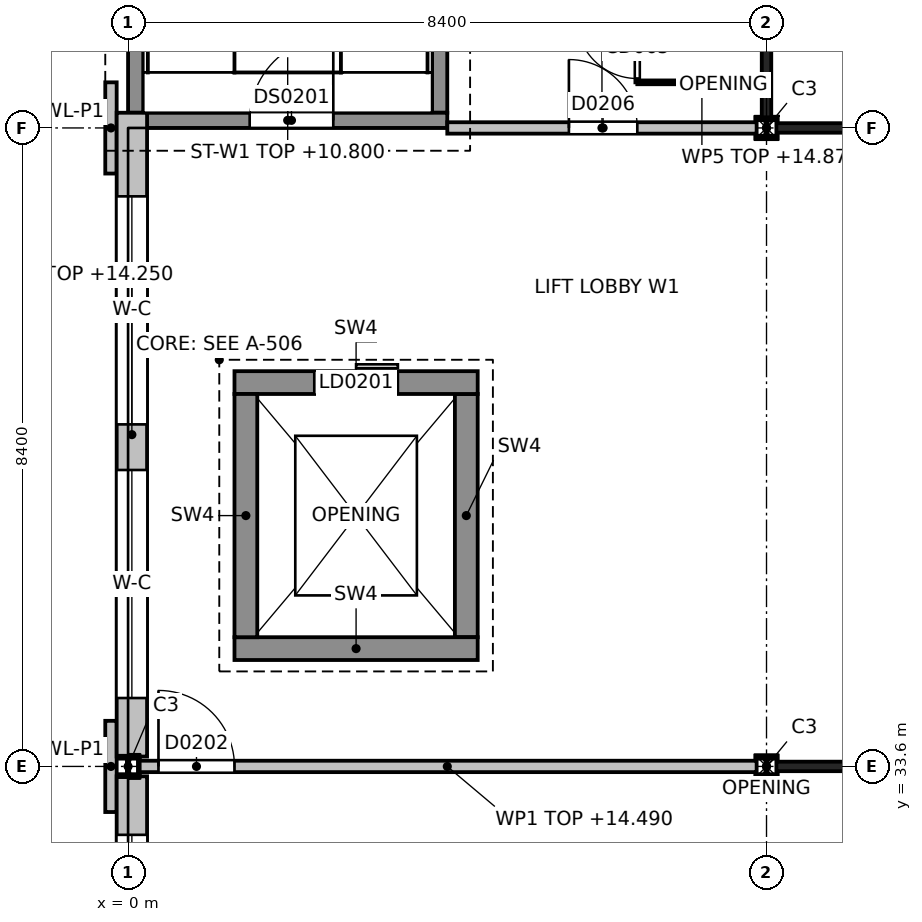
"""IFC4 building model, lengths in metres.
Left out: names, types, materials, properties, quantities, classifications, styles, units other than length and angle.
Written with IfcOpenShell. Run it as: python <this file> out.ifc"""

import sys

from ifc_helpers import new_model, si_unit, direction, frame, frame_2d, origin, origin_2d, place, context, subcontext, project, spatial, rectangle, i_section, extrude, element, fill, save


model = new_model("IFC4")
c1 = context("Model", 3, precision=1e-05, world=origin(), true_north=direction((0.0, 1.0)))
c2 = subcontext(c1, "Body", "Model", "MODEL_VIEW")
j1 = project(units=[si_unit("LENGTHUNIT", "METRE"), si_unit("PLANEANGLEUNIT", "RADIAN")], contexts=[c1])
p1 = place(None, origin())
s1 = spatial("IfcSite", under=j1, at=p1, CompositionType="ELEMENT")
p2 = place(p1, origin())
s2 = spatial("IfcBuilding", under=s1, at=p2, CompositionType="ELEMENT")
p3 = place(p2, frame((0.0, 0.0, 10.8)))
s3 = spatial("IfcBuildingStorey", under=s2, at=p3, CompositionType="ELEMENT", Elevation=10.8)
for number, where, z_axis, x_axis in (
    (1, (0.0, 33.6, 0.0), (0.0, 0.0, 1.0), (1.0, 0.0, 0.0)),
    (2, (8.4, 33.6, 0.0), (0.0, 0.0, 1.0), (1.0, 0.0, 0.0)),
    (3, (8.4, 42.0, 0.0), (0.0, 0.0, 1.0), (1.0, 0.0, 0.0)),
):
    element("IfcColumn", number, at=place(p3, frame(where, z_axis=z_axis, x_axis=x_axis)), inside=s3, PredefinedType="COLUMN", context=c2, shape_type="SweptSolid", body=[
        extrude(i_section(OverallWidth=0.26, OverallDepth=0.26, WebThickness=0.01, FlangeThickness=0.018, at=origin_2d()), origin(), (0.0, 0.0, 1.0), 4.2),
    ])
p4 = place(p3, frame((0.0, 42.1, 0.0), z_axis=(0.0, 0.0, 1.0), x_axis=(1.0, 0.0, 0.0)))
e4 = element("IfcWall", 4, at=p4, inside=s3, PredefinedType="SHEAR", context=c2, shape_type="SweptSolid", body=[
    extrude(rectangle(XDim=4.2, YDim=0.2, at=frame_2d((2.1, 0.0))), origin(), (0.0, 0.0, 1.0), 4.2),
])
p5 = place(p4, frame((1.6, 0.0, 0.0)))
e5 = element("IfcOpeningElement", 5, at=p5, cuts=e4, PredefinedType="OPENING", context=c2, shape_type="SweptSolid", body=[
    extrude(rectangle(XDim=1.1, YDim=2.1, at=frame_2d((0.55, 1.05))), frame((0.0, 0.1, 0.0), z_axis=(0.0, -1.0, 0.0), x_axis=(1.0, 0.0, 0.0)), (0.0, 0.0, 1.0), 0.2),
])
for number, where, z_axis, x_axis in (
    (6, (0.1, 42.2, 0.0), (0.0, 0.0, 1.0), (0.0, 1.0, 0.0)),
    (7, (4.1, 42.2, 0.0), (0.0, 0.0, 1.0), (0.0, 1.0, 0.0)),
):
    element("IfcWall", number, at=place(p3, frame(where, z_axis=z_axis, x_axis=x_axis)), inside=s3, PredefinedType="SHEAR", context=c2, shape_type="SweptSolid", body=[
        extrude(rectangle(XDim=8.0, YDim=0.2, at=frame_2d((4.0, 0.0))), origin(), (0.0, 0.0, 1.0), 4.2),
    ])
p6 = place(p3, frame((1.4, 35.15, 0.0), z_axis=(0.0, 0.0, 1.0), x_axis=(1.0, 0.0, 0.0)))
e8 = element("IfcWall", 8, at=p6, inside=s3, PredefinedType="SHEAR", context=c2, shape_type="SweptSolid", body=[
    extrude(rectangle(XDim=3.2, YDim=0.3, at=frame_2d((1.6, 0.0))), origin(), (0.0, 0.0, 1.0), 4.2),
])
p7 = place(p3, frame((1.4, 38.65, 0.0), z_axis=(0.0, 0.0, 1.0), x_axis=(1.0, 0.0, 0.0)))
e9 = element("IfcWall", 9, at=p7, inside=s3, PredefinedType="SHEAR", context=c2, shape_type="SweptSolid", body=[
    extrude(rectangle(XDim=3.2, YDim=0.3, at=frame_2d((1.6, 0.0))), origin(), (0.0, 0.0, 1.0), 4.2),
])
p8 = place(p7, frame((1.05, 0.0, 0.0)))
e10 = element("IfcOpeningElement", 10, at=p8, cuts=e9, PredefinedType="OPENING", context=c2, shape_type="SweptSolid", body=[
    extrude(rectangle(XDim=1.1, YDim=2.1, at=frame_2d((0.55, 1.05))), frame((0.0, 0.15, 0.0), z_axis=(0.0, -1.0, 0.0), x_axis=(1.0, 0.0, 0.0)), (0.0, 0.0, 1.0), 0.3),
])
for number, where, z_axis, x_axis in (
    (11, (1.55, 35.3, 0.0), (0.0, 0.0, 1.0), (0.0, 1.0, 0.0)),
    (12, (4.45, 35.3, 0.0), (0.0, 0.0, 1.0), (0.0, 1.0, 0.0)),
):
    element("IfcWall", number, at=place(p3, frame(where, z_axis=z_axis, x_axis=x_axis)), inside=s3, PredefinedType="SHEAR", context=c2, shape_type="SweptSolid", body=[
        extrude(rectangle(XDim=3.2, YDim=0.3, at=frame_2d((1.6, 0.0))), origin(), (0.0, 0.0, 1.0), 4.2),
    ])
p9 = place(p3, frame((0.05, 25.33, 0.0), z_axis=(0.0, 0.0, 1.0), x_axis=(0.0, 1.0, 0.0)))
e13 = element("IfcWall", 13, at=p9, inside=s3, PredefinedType="SOLIDWALL", context=c2, shape_type="SweptSolid", body=[
    extrude(rectangle(XDim=8.14, YDim=0.4, at=frame_2d((4.07, 0.0))), origin(), (0.0, 0.0, 1.0), 3.45),
])
p10 = place(p9, frame((0.77, 0.0, 0.9)))
e14 = element("IfcOpeningElement", 14, at=p10, cuts=e13, PredefinedType="OPENING", context=c2, shape_type="SweptSolid", body=[
    extrude(rectangle(XDim=3.0, YDim=2.4, at=frame_2d((1.5, 1.2))), frame((0.0, 0.2, 0.0), z_axis=(0.0, -1.0, 0.0), x_axis=(1.0, 0.0, 0.0)), (0.0, 0.0, 1.0), 0.4),
])
p11 = place(p9, frame((4.37, 0.0, 0.9)))
e15 = element("IfcOpeningElement", 15, at=p11, cuts=e13, PredefinedType="OPENING", context=c2, shape_type="SweptSolid", body=[
    extrude(rectangle(XDim=3.0, YDim=2.4, at=frame_2d((1.5, 1.2))), frame((0.0, 0.2, 0.0), z_axis=(0.0, -1.0, 0.0), x_axis=(1.0, 0.0, 0.0)), (0.0, 0.0, 1.0), 0.4),
])
p12 = place(p3, frame((0.05, 33.73, 0.0), z_axis=(0.0, 0.0, 1.0), x_axis=(0.0, 1.0, 0.0)))
e16 = element("IfcWall", 16, at=p12, inside=s3, PredefinedType="SOLIDWALL", context=c2, shape_type="SweptSolid", body=[
    extrude(rectangle(XDim=8.47, YDim=0.4, at=frame_2d((4.235, 0.0))), origin(), (0.0, 0.0, 1.0), 3.45),
])
p13 = place(p12, frame((0.77, 0.0, 0.9)))
e17 = element("IfcOpeningElement", 17, at=p13, cuts=e16, PredefinedType="OPENING", context=c2, shape_type="SweptSolid", body=[
    extrude(rectangle(XDim=3.0, YDim=2.4, at=frame_2d((1.5, 1.2))), frame((0.0, 0.2, 0.0), z_axis=(0.0, -1.0, 0.0), x_axis=(1.0, 0.0, 0.0)), (0.0, 0.0, 1.0), 0.4),
])
p14 = place(p12, frame((4.37, 0.0, 0.9)))
e18 = element("IfcOpeningElement", 18, at=p14, cuts=e16, PredefinedType="OPENING", context=c2, shape_type="SweptSolid", body=[
    extrude(rectangle(XDim=3.0, YDim=2.4, at=frame_2d((1.5, 1.2))), frame((0.0, 0.2, 0.0), z_axis=(0.0, -1.0, 0.0), x_axis=(1.0, 0.0, 0.0)), (0.0, 0.0, 1.0), 0.4),
])
p15 = place(p3, frame((-0.225, 33.0, 0.0), z_axis=(0.0, 0.0, 1.0), x_axis=(0.0, 1.0, 0.0)))
e19 = element("IfcWall", 19, at=p15, inside=s3, PredefinedType="SOLIDWALL", context=c2, shape_type="SweptSolid", body=[
    extrude(rectangle(XDim=1.2, YDim=0.15, at=frame_2d((0.6, 0.0))), origin(), (0.0, 0.0, 1.0), 4.2),
])
p16 = place(p3, frame((-0.225, 41.4, 0.0), z_axis=(0.0, 0.0, 1.0), x_axis=(0.0, 1.0, 0.0)))
e20 = element("IfcWall", 20, at=p16, inside=s3, PredefinedType="SOLIDWALL", context=c2, shape_type="SweptSolid", body=[
    extrude(rectangle(XDim=1.2, YDim=0.15, at=frame_2d((0.6, 0.0))), origin(), (0.0, 0.0, 1.0), 4.2),
])
p17 = place(p3, frame((0.13, 33.6, 0.0), z_axis=(0.0, 0.0, 1.0), x_axis=(1.0, 0.0, 0.0)))
e21 = element("IfcWall", 21, at=p17, inside=s3, PredefinedType="PARTITIONING", context=c2, shape_type="SweptSolid", body=[
    extrude(rectangle(XDim=8.14, YDim=0.15, at=frame_2d((4.07, 0.0))), origin(), (0.0, 0.0, 1.0), 3.69),
])
p18 = place(p17, frame((0.27, 0.0, 0.0)))
e22 = element("IfcOpeningElement", 22, at=p18, cuts=e21, PredefinedType="OPENING", context=c2, shape_type="SweptSolid", body=[
    extrude(rectangle(XDim=1.0, YDim=2.2, at=frame_2d((0.5, 1.1))), frame((0.0, 0.075, 0.0), z_axis=(0.0, -1.0, 0.0), x_axis=(1.0, 0.0, 0.0)), (0.0, 0.0, 1.0), 0.15),
])
p19 = place(p3, frame((8.53, 33.6, 0.0), z_axis=(0.0, 0.0, 1.0), x_axis=(1.0, 0.0, 0.0)))
e23 = element("IfcWall", 23, at=p19, inside=s3, PredefinedType="PARTITIONING", context=c2, shape_type="SweptSolid", body=[
    extrude(rectangle(XDim=8.14, YDim=0.125, at=frame_2d((4.07, 0.0))), origin(), (0.0, 0.0, 1.0), 3.69),
])
p20 = place(p19, frame((3.57, 0.0, 0.0)))
e24 = element("IfcOpeningElement", 24, at=p20, cuts=e23, PredefinedType="OPENING", context=c2, shape_type="SweptSolid", body=[
    extrude(rectangle(XDim=1.0, YDim=2.2, at=frame_2d((0.5, 1.1))), frame((0.0, 0.062, 0.0), z_axis=(0.0, -1.0, 0.0), x_axis=(1.0, 0.0, 0.0)), (0.0, 0.0, 1.0), 0.125),
])
p21 = place(p3, frame((4.2, 42.0, 0.0), z_axis=(0.0, 0.0, 1.0), x_axis=(1.0, 0.0, 0.0)))
e25 = element("IfcWall", 25, at=p21, inside=s3, PredefinedType="PARTITIONING", context=c2, shape_type="SweptSolid", body=[
    extrude(rectangle(XDim=4.07, YDim=0.15, at=frame_2d((2.035, 0.0))), origin(), (0.0, 0.0, 1.0), 4.07),
])
p22 = place(p21, frame((1.6, 0.0, 0.0)))
e26 = element("IfcOpeningElement", 26, at=p22, cuts=e25, PredefinedType="OPENING", context=c2, shape_type="SweptSolid", body=[
    extrude(rectangle(XDim=0.9, YDim=2.1, at=frame_2d((0.45, 1.05))), frame((0.0, 0.075, 0.0), z_axis=(0.0, -1.0, 0.0), x_axis=(1.0, 0.0, 0.0)), (0.0, 0.0, 1.0), 0.15),
])
p23 = place(p3, frame((8.53, 42.0, 0.0), z_axis=(0.0, 0.0, 1.0), x_axis=(1.0, 0.0, 0.0)))
e27 = element("IfcWall", 27, at=p23, inside=s3, PredefinedType="PARTITIONING", context=c2, shape_type="SweptSolid", body=[
    extrude(rectangle(XDim=4.07, YDim=0.125, at=frame_2d((2.035, 0.0))), origin(), (0.0, 0.0, 1.0), 3.71),
])
p24 = place(p23, frame((1.47, 0.0, 0.0)))
e28 = element("IfcOpeningElement", 28, at=p24, cuts=e27, PredefinedType="OPENING", context=c2, shape_type="SweptSolid", body=[
    extrude(rectangle(XDim=1.0, YDim=2.1, at=frame_2d((0.5, 1.05))), frame((0.0, 0.062, 0.0), z_axis=(0.0, -1.0, 0.0), x_axis=(1.0, 0.0, 0.0)), (0.0, 0.0, 1.0), 0.125),
])
p25 = place(p3, frame((8.4, 42.13, 0.0), z_axis=(0.0, 0.0, 1.0), x_axis=(0.0, 1.0, 0.0)))
e29 = element("IfcWall", 29, at=p25, inside=s3, PredefinedType="PARTITIONING", context=c2, shape_type="SweptSolid", body=[
    extrude(rectangle(XDim=8.14, YDim=0.125, at=frame_2d((4.07, 0.0))), origin(), (0.0, 0.0, 1.0), 3.68),
])
p26 = place(p3, frame((6.7, 42.6, 0.0), z_axis=(0.0, 0.0, 1.0), x_axis=(0.0, 1.0, 0.0)))
e30 = element("IfcWall", 30, at=p26, inside=s3, PredefinedType="PARTITIONING", context=c2, shape_type="SweptSolid", body=[
    extrude(rectangle(XDim=7.2, YDim=0.05, at=frame_2d((3.6, 0.0))), origin(), (0.0, 0.0, 1.0), 4.07),
])
p27 = place(p26, frame((0.05, 0.0, 0.0)))
e31 = element("IfcOpeningElement", 31, at=p27, cuts=e30, PredefinedType="OPENING", context=c2, shape_type="SweptSolid", body=[
    extrude(rectangle(XDim=0.8, YDim=2.0, at=frame_2d((0.4, 1.0))), frame((0.0, 0.025, 0.0), z_axis=(0.0, -1.0, 0.0), x_axis=(1.0, 0.0, 0.0)), (0.0, 0.0, 1.0), 0.05),
])
p28 = place(p26, frame((0.95, 0.0, 0.0)))
e32 = element("IfcOpeningElement", 32, at=p28, cuts=e30, PredefinedType="OPENING", context=c2, shape_type="SweptSolid", body=[
    extrude(rectangle(XDim=0.8, YDim=2.0, at=frame_2d((0.4, 1.0))), frame((0.0, 0.025, 0.0), z_axis=(0.0, -1.0, 0.0), x_axis=(1.0, 0.0, 0.0)), (0.0, 0.0, 1.0), 0.05),
])
p29 = place(p26, frame((1.85, 0.0, 0.0)))
e33 = element("IfcOpeningElement", 33, at=p29, cuts=e30, PredefinedType="OPENING", context=c2, shape_type="SweptSolid", body=[
    extrude(rectangle(XDim=0.8, YDim=2.0, at=frame_2d((0.4, 1.0))), frame((0.0, 0.025, 0.0), z_axis=(0.0, -1.0, 0.0), x_axis=(1.0, 0.0, 0.0)), (0.0, 0.0, 1.0), 0.05),
])
p30 = place(p26, frame((2.75, 0.0, 0.0)))
e34 = element("IfcOpeningElement", 34, at=p30, cuts=e30, PredefinedType="OPENING", context=c2, shape_type="SweptSolid", body=[
    extrude(rectangle(XDim=0.8, YDim=2.0, at=frame_2d((0.4, 1.0))), frame((0.0, 0.025, 0.0), z_axis=(0.0, -1.0, 0.0), x_axis=(1.0, 0.0, 0.0)), (0.0, 0.0, 1.0), 0.05),
])
p31 = place(p26, frame((3.65, 0.0, 0.0)))
e35 = element("IfcOpeningElement", 35, at=p31, cuts=e30, PredefinedType="OPENING", context=c2, shape_type="SweptSolid", body=[
    extrude(rectangle(XDim=0.8, YDim=2.0, at=frame_2d((0.4, 1.0))), frame((0.0, 0.025, 0.0), z_axis=(0.0, -1.0, 0.0), x_axis=(1.0, 0.0, 0.0)), (0.0, 0.0, 1.0), 0.05),
])
p32 = place(p26, frame((4.55, 0.0, 0.0)))
e36 = element("IfcOpeningElement", 36, at=p32, cuts=e30, PredefinedType="OPENING", context=c2, shape_type="SweptSolid", body=[
    extrude(rectangle(XDim=0.8, YDim=2.0, at=frame_2d((0.4, 1.0))), frame((0.0, 0.025, 0.0), z_axis=(0.0, -1.0, 0.0), x_axis=(1.0, 0.0, 0.0)), (0.0, 0.0, 1.0), 0.05),
])
p33 = place(p26, frame((5.45, 0.0, 0.0)))
e37 = element("IfcOpeningElement", 37, at=p33, cuts=e30, PredefinedType="OPENING", context=c2, shape_type="SweptSolid", body=[
    extrude(rectangle(XDim=0.8, YDim=2.0, at=frame_2d((0.4, 1.0))), frame((0.0, 0.025, 0.0), z_axis=(0.0, -1.0, 0.0), x_axis=(1.0, 0.0, 0.0)), (0.0, 0.0, 1.0), 0.05),
])
p34 = place(p26, frame((6.35, 0.0, 0.0)))
e38 = element("IfcOpeningElement", 38, at=p34, cuts=e30, PredefinedType="OPENING", context=c2, shape_type="SweptSolid", body=[
    extrude(rectangle(XDim=0.8, YDim=2.0, at=frame_2d((0.4, 1.0))), frame((0.0, 0.025, 0.0), z_axis=(0.0, -1.0, 0.0), x_axis=(1.0, 0.0, 0.0)), (0.0, 0.0, 1.0), 0.05),
])
p35 = place(p3, frame((8.4, 42.6, 0.0), z_axis=(0.0, 0.0, 1.0), x_axis=(-1.0, 0.0, 0.0)))
e39 = element("IfcWall", 39, at=p35, inside=s3, PredefinedType="PARTITIONING", context=c2, shape_type="SweptSolid", body=[
    extrude(rectangle(XDim=1.7, YDim=0.05, at=frame_2d((0.85, 0.0))), origin(), (0.0, 0.0, 1.0), 4.07),
])
p36 = place(p11, origin())
e40 = element("IfcWindow", 40, at=p36, inside=s3, PartitioningType="SINGLE_PANEL", PredefinedType="WINDOW", context=c2, shape_type="SweptSolid", body=[
    extrude(rectangle(XDim=3.0, YDim=2.4, at=frame_2d((1.5, 1.2))), frame((0.0, 0.03, 0.0), z_axis=(0.0, -1.0, 0.0), x_axis=(1.0, 0.0, 0.0)), (0.0, 0.0, 1.0), 0.06),
])
fill(e15, e40)
p37 = place(p13, origin())
e41 = element("IfcWindow", 41, at=p37, inside=s3, PartitioningType="SINGLE_PANEL", PredefinedType="WINDOW", context=c2, shape_type="SweptSolid", body=[
    extrude(rectangle(XDim=3.0, YDim=2.4, at=frame_2d((1.5, 1.2))), frame((0.0, 0.03, 0.0), z_axis=(0.0, -1.0, 0.0), x_axis=(1.0, 0.0, 0.0)), (0.0, 0.0, 1.0), 0.06),
])
fill(e17, e41)
p38 = place(p14, origin())
e42 = element("IfcWindow", 42, at=p38, inside=s3, PartitioningType="SINGLE_PANEL", PredefinedType="WINDOW", context=c2, shape_type="SweptSolid", body=[
    extrude(rectangle(XDim=3.0, YDim=2.4, at=frame_2d((1.5, 1.2))), frame((0.0, 0.03, 0.0), z_axis=(0.0, -1.0, 0.0), x_axis=(1.0, 0.0, 0.0)), (0.0, 0.0, 1.0), 0.06),
])
fill(e18, e42)
p39 = place(p18, origin())
e43 = element("IfcDoor", 43, at=p39, inside=s3, OperationType="SINGLE_SWING_LEFT", PredefinedType="DOOR", context=c2, shape_type="SweptSolid", body=[
    extrude(rectangle(XDim=1.0, YDim=2.2, at=frame_2d((0.5, 1.1))), frame((0.0, 0.025, 0.0), z_axis=(0.0, -1.0, 0.0), x_axis=(1.0, 0.0, 0.0)), (0.0, 0.0, 1.0), 0.05),
])
fill(e22, e43)
p40 = place(p22, origin())
e44 = element("IfcDoor", 44, at=p40, inside=s3, OperationType="SINGLE_SWING_LEFT", PredefinedType="DOOR", context=c2, shape_type="SweptSolid", body=[
    extrude(rectangle(XDim=0.9, YDim=2.1, at=frame_2d((0.45, 1.05))), frame((0.0, 0.025, 0.0), z_axis=(0.0, -1.0, 0.0), x_axis=(1.0, 0.0, 0.0)), (0.0, 0.0, 1.0), 0.05),
])
fill(e26, e44)
p41 = place(p5, origin())
e45 = element("IfcDoor", 45, at=p41, inside=s3, OperationType="SINGLE_SWING_RIGHT", PredefinedType="DOOR", context=c2, shape_type="SweptSolid", body=[
    extrude(rectangle(XDim=1.1, YDim=2.1, at=frame_2d((0.55, 1.05))), frame((0.0, 0.025, 0.0), z_axis=(0.0, -1.0, 0.0), x_axis=(1.0, 0.0, 0.0)), (0.0, 0.0, 1.0), 0.05),
])
fill(e5, e45)
p42 = place(p8, origin())
e46 = element("IfcDoor", 46, at=p42, inside=s3, OperationType="SLIDING_TO_LEFT", PredefinedType="DOOR", context=c2, shape_type="SweptSolid", body=[
    extrude(rectangle(XDim=1.1, YDim=2.1, at=frame_2d((0.55, 1.05))), frame((0.0, 0.025, 0.0), z_axis=(0.0, -1.0, 0.0), x_axis=(1.0, 0.0, 0.0)), (0.0, 0.0, 1.0), 0.05),
])
fill(e10, e46)
p43 = place(p27, origin())
e47 = element("IfcDoor", 47, at=p43, inside=s3, OperationType="SINGLE_SWING_RIGHT", PredefinedType="DOOR", context=c2, shape_type="SweptSolid", body=[
    extrude(rectangle(XDim=0.8, YDim=2.0, at=frame_2d((0.4, 1.0))), frame((0.0, 0.025, 0.0), z_axis=(0.0, -1.0, 0.0), x_axis=(1.0, 0.0, 0.0)), (0.0, 0.0, 1.0), 0.05),
])
fill(e31, e47)
save(model, sys.argv[1])
